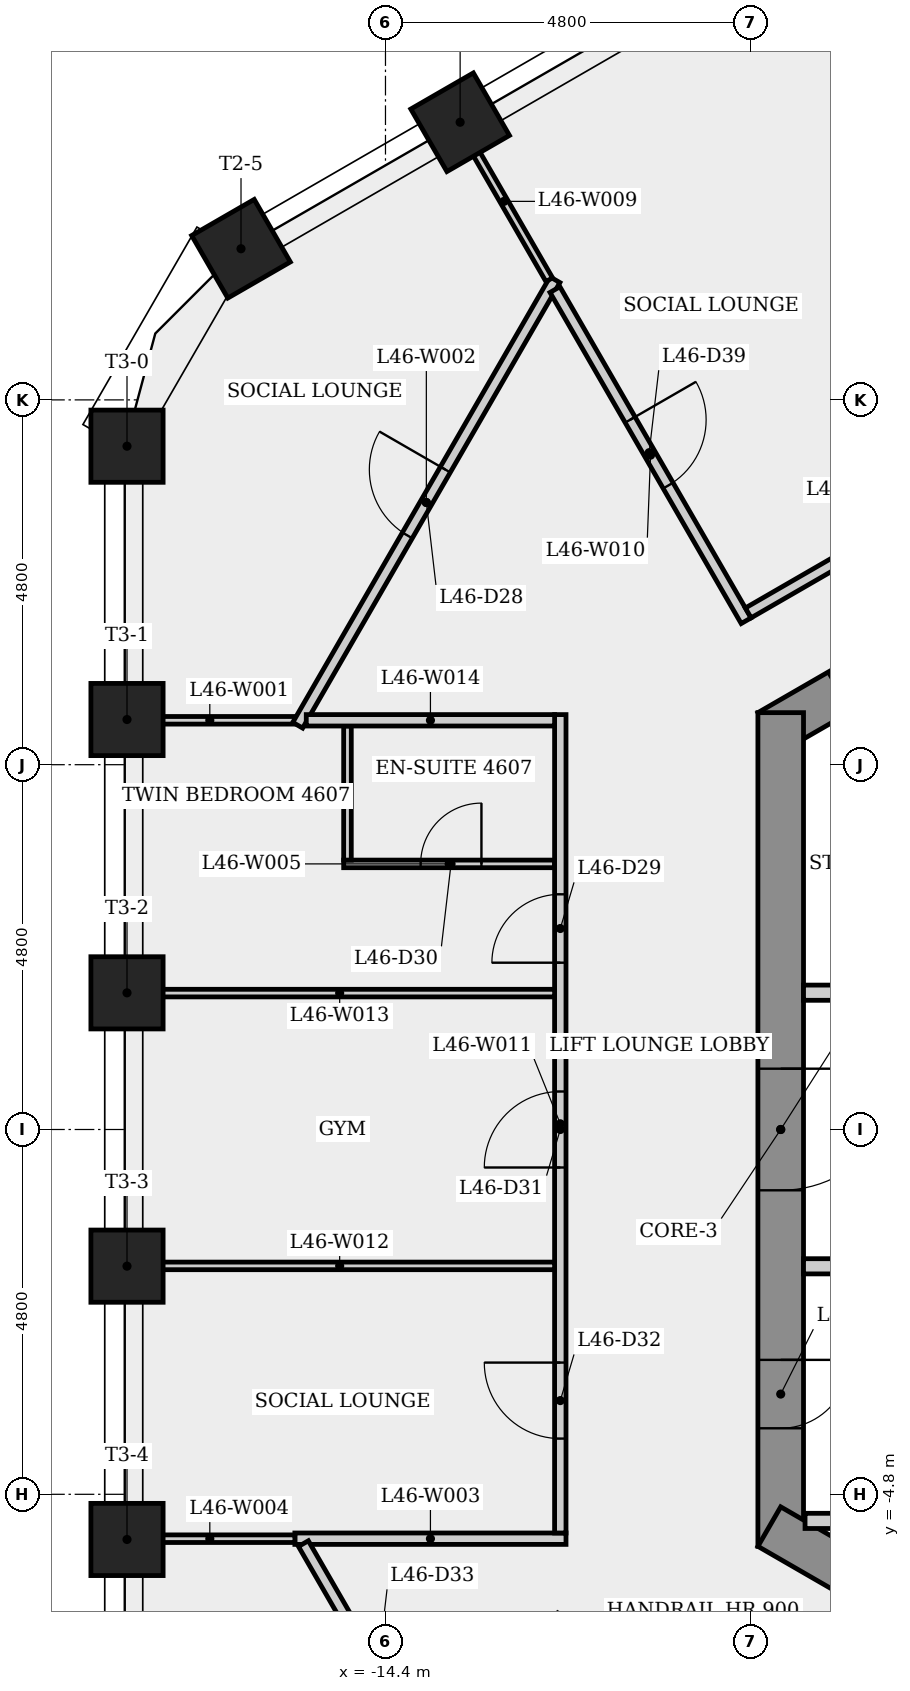
"""IFC4 building model, lengths in metres.
Left out: names, types, materials, properties, quantities, classifications, styles, units other than length and angle.
Written with IfcOpenShell. Run it as: python <this file> out.ifc"""

import sys

from ifc_helpers import new_model, si_unit, direction, frame, frame_2d, origin, origin_2d, place, context, subcontext, project, spatial, rectangle, extrude, element, fill, save


model = new_model("IFC4")
c1 = context("Model", 3, precision=1e-05, world=origin(), true_north=direction((0.0, 1.0)))
c2 = subcontext(c1, "Body", "Model", "MODEL_VIEW")
j1 = project(units=[si_unit("LENGTHUNIT", "METRE"), si_unit("PLANEANGLEUNIT", "RADIAN")], contexts=[c1])
p1 = place(None, origin())
s1 = spatial("IfcSite", under=j1, at=p1, CompositionType="ELEMENT")
p2 = place(p1, origin())
s2 = spatial("IfcBuilding", under=s1, at=p2, CompositionType="ELEMENT")
p3 = place(p2, frame((0.0, 0.0, 173.1)))
s3 = spatial("IfcBuildingStorey", under=s2, at=p3, CompositionType="ELEMENT", Elevation=173.1)
p4 = place(p3, frame((0.15, 10.71, 0.0), z_axis=(0.0, 0.0, 1.0), x_axis=(-0.866023993627, -0.500002442456, 0.0)))
e1 = element("IfcWall", 1, at=p4, inside=s3, PredefinedType="SHEAR", context=c2, shape_type="SweptSolid", body=[
    extrude(rectangle(XDim=10.97, YDim=0.6, at=frame_2d((5.485, 0.0))), origin(), (0.0, 0.0, 1.0), 3.4),
])
p5 = place(p4, frame((9.013, 0.0, 0.0)))
e2 = element("IfcOpeningElement", 2, at=p5, cuts=e1, PredefinedType="OPENING", context=c2, shape_type="SweptSolid", body=[
    extrude(rectangle(XDim=0.9, YDim=2.1, at=frame_2d((0.45, 1.05))), frame((0.0, 0.31, 0.0), z_axis=(0.0, -1.0, 0.0), x_axis=(1.0, 0.0, 0.0)), (0.0, 0.0, 1.0), 0.62),
])
p6 = place(p4, frame((2.437, 0.0, 0.0)))
e3 = element("IfcOpeningElement", 3, at=p6, cuts=e1, PredefinedType="OPENING", context=c2, shape_type="SweptSolid", body=[
    extrude(rectangle(XDim=0.9, YDim=2.1, at=frame_2d((0.45, 1.05))), frame((0.0, 0.31, 0.0), z_axis=(0.0, -1.0, 0.0), x_axis=(1.0, 0.0, 0.0)), (0.0, 0.0, 1.0), 0.62),
])
p7 = place(p3, frame((-9.2, 5.485, 0.0), z_axis=(0.0, 0.0, 1.0), x_axis=(0.0, -1.0, 0.0)))
e4 = element("IfcWall", 4, at=p7, inside=s3, PredefinedType="SHEAR", context=c2, shape_type="SweptSolid", body=[
    extrude(rectangle(XDim=10.97, YDim=0.6, at=frame_2d((5.485, 0.0))), origin(), (0.0, 0.0, 1.0), 3.4),
])
p8 = place(p7, frame((8.516, 0.0, 0.0)))
e5 = element("IfcOpeningElement", 5, at=p8, cuts=e4, PredefinedType="OPENING", context=c2, shape_type="SweptSolid", body=[
    extrude(rectangle(XDim=0.9, YDim=2.1, at=frame_2d((0.45, 1.05))), frame((0.0, 0.31, 0.0), z_axis=(0.0, -1.0, 0.0), x_axis=(1.0, 0.0, 0.0)), (0.0, 0.0, 1.0), 0.62),
])
p9 = place(p7, frame((4.685, 0.0, 0.0)))
e6 = element("IfcOpeningElement", 6, at=p9, cuts=e4, PredefinedType="OPENING", context=c2, shape_type="SweptSolid", body=[
    extrude(rectangle(XDim=1.6, YDim=2.1, at=frame_2d((0.8, 1.05))), frame((0.0, 0.31, 0.0), z_axis=(0.0, -1.0, 0.0), x_axis=(1.0, 0.0, 0.0)), (0.0, 0.0, 1.0), 0.62),
])
p10 = place(p3, frame((-9.35, -5.225, 0.0), z_axis=(0.0, 0.0, 1.0), x_axis=(0.866023993627, -0.500002442456, 0.0)))
e7 = element("IfcWall", 7, at=p10, inside=s3, PredefinedType="SHEAR", context=c2, shape_type="SweptSolid", body=[
    extrude(rectangle(XDim=10.97, YDim=0.6, at=frame_2d((5.485, 0.0))), origin(), (0.0, 0.0, 1.0), 3.4),
])
p11 = place(p10, frame((3.084, 0.0, 0.0)))
e8 = element("IfcOpeningElement", 8, at=p11, cuts=e7, PredefinedType="OPENING", context=c2, shape_type="SweptSolid", body=[
    extrude(rectangle(XDim=0.9, YDim=2.1, at=frame_2d((0.45, 1.05))), frame((0.0, 0.31, 0.0), z_axis=(0.0, -1.0, 0.0), x_axis=(1.0, 0.0, 0.0)), (0.0, 0.0, 1.0), 0.62),
])
p12 = place(p10, frame((8.21, 0.0, 0.0)))
e9 = element("IfcOpeningElement", 9, at=p12, cuts=e7, PredefinedType="OPENING", context=c2, shape_type="SweptSolid", body=[
    extrude(rectangle(XDim=0.9, YDim=2.1, at=frame_2d((0.45, 1.05))), frame((0.0, 0.31, 0.0), z_axis=(0.0, -1.0, 0.0), x_axis=(1.0, 0.0, 0.0)), (0.0, 0.0, 1.0), 0.62),
])
for number, where, z_axis, x_axis in (
    (10, (-13.418, 13.253, 0.0), (0.0, 0.0, 1.0), (-0.5, 0.866, 0.0)),
    (11, (-16.301, 11.589, 0.0), (0.0, 0.0, 1.0), (-0.5, 0.866, 0.0)),
    (12, (-17.801, 8.991, 0.0), (0.0, 0.0, 1.0), (-1.0, 0.0, 0.0)),
    (13, (-17.801, 5.394, 0.0), (0.0, 0.0, 1.0), (-1.0, 0.0, 0.0)),
    (14, (-17.801, 1.798, 0.0), (0.0, 0.0, 1.0), (-1.0, 0.0, 0.0)),
    (15, (-17.801, -1.798, 0.0), (0.0, 0.0, 1.0), (-1.0, 0.0, 0.0)),
    (16, (-17.801, -5.394, 0.0), (0.0, 0.0, 1.0), (-1.0, 0.0, 0.0)),
):
    element("IfcColumn", number, at=place(p3, frame(where, z_axis=z_axis, x_axis=x_axis)), inside=s3, PredefinedType="COLUMN", context=c2, shape_type="SweptSolid", body=[
        extrude(rectangle(XDim=0.95, YDim=0.95, at=origin_2d()), origin(), (0.0, 0.0, 1.0), 3.4),
    ])
p13 = place(p3, frame((-15.592, 5.384, 0.0), z_axis=(0.0, 0.0, 1.0), x_axis=(-1.0, 0.0, 0.0)))
e17 = element("IfcWall", 17, at=p13, inside=s3, PredefinedType="PARTITIONING", context=c2, shape_type="SweptSolid", body=[
    extrude(rectangle(XDim=2.238, YDim=0.1, at=frame_2d((1.119, 0.0))), origin(), (0.0, 0.0, 1.0), 3.05),
])
p14 = place(p3, frame((-15.555, 5.319, 0.0), z_axis=(0.0, 0.0, 1.0), x_axis=(0.500006564844, 0.866021613537, 0.0)))
e18 = element("IfcWall", 18, at=p14, inside=s3, PredefinedType="PARTITIONING", context=c2, shape_type="SweptSolid", body=[
    extrude(rectangle(XDim=6.769, YDim=0.15, at=frame_2d((3.385, 0.0))), origin(), (0.0, 0.0, 1.0), 3.05),
])
p15 = place(p14, frame((2.885, 0.0, 0.0)))
e19 = element("IfcOpeningElement", 19, at=p15, cuts=e18, PredefinedType="OPENING", context=c2, shape_type="SweptSolid", body=[
    extrude(rectangle(XDim=1.0, YDim=2.1, at=frame_2d((0.5, 1.05))), frame((0.0, 0.085, 0.0), z_axis=(0.0, -1.0, 0.0), x_axis=(1.0, 0.0, 0.0)), (0.0, 0.0, 1.0), 0.17),
])
p16 = place(p3, frame((-15.592, -5.384, 0.0), z_axis=(0.0, 0.0, 1.0), x_axis=(1.0, 0.0, 0.0)))
e20 = element("IfcWall", 20, at=p16, inside=s3, PredefinedType="PARTITIONING", context=c2, shape_type="SweptSolid", body=[
    extrude(rectangle(XDim=3.567, YDim=0.15, at=frame_2d((1.784, 0.0))), origin(), (0.0, 0.0, 1.0), 3.05),
])
p17 = place(p3, frame((-15.592, -5.384, 0.0), z_axis=(0.0, 0.0, 1.0), x_axis=(-1.0, 0.0, 0.0)))
e21 = element("IfcWall", 21, at=p17, inside=s3, PredefinedType="PARTITIONING", context=c2, shape_type="SweptSolid", body=[
    extrude(rectangle(XDim=2.239, YDim=0.1, at=frame_2d((1.119, 0.0))), origin(), (0.0, 0.0, 1.0), 3.05),
])
p18 = place(p3, frame((-14.95, 3.495, 0.0), z_axis=(0.0, 0.0, 1.0), x_axis=(1.0, 0.0, 0.0)))
e22 = element("IfcWall", 22, at=p18, inside=s3, PredefinedType="PARTITIONING", context=c2, shape_type="SweptSolid", body=[
    extrude(rectangle(XDim=2.775, YDim=0.1, at=frame_2d((1.387, 0.0))), origin(), (0.0, 0.0, 1.0), 3.05),
])
p19 = place(p18, frame((1.012, 0.0, 0.0)))
e23 = element("IfcOpeningElement", 23, at=p19, cuts=e22, PredefinedType="OPENING", context=c2, shape_type="SweptSolid", body=[
    extrude(rectangle(XDim=0.8, YDim=2.1, at=frame_2d((0.4, 1.05))), frame((0.0, 0.06, 0.0), z_axis=(0.0, -1.0, 0.0), x_axis=(1.0, 0.0, 0.0)), (0.0, 0.0, 1.0), 0.12),
])
p20 = place(p3, frame((-14.9, 5.309, 0.0), z_axis=(0.0, 0.0, 1.0), x_axis=(0.0, -1.0, 0.0)))
e24 = element("IfcWall", 24, at=p20, inside=s3, PredefinedType="PARTITIONING", context=c2, shape_type="SweptSolid", body=[
    extrude(rectangle(XDim=1.764, YDim=0.1, at=frame_2d((0.882, 0.0))), origin(), (0.0, 0.0, 1.0), 3.05),
])
p21 = place(p3, frame((-13.532, -8.822, 0.0), z_axis=(0.0, 0.0, 1.0), x_axis=(-0.500042595688, 0.866000809756, 0.0)))
e25 = element("IfcWall", 25, at=p21, inside=s3, PredefinedType="PARTITIONING", context=c2, shape_type="SweptSolid", body=[
    extrude(rectangle(XDim=3.895, YDim=0.15, at=frame_2d((1.947, 0.0))), origin(), (0.0, 0.0, 1.0), 3.05),
])
p22 = place(p21, frame((1.448, 0.0, 0.0)))
e26 = element("IfcOpeningElement", 26, at=p22, cuts=e25, PredefinedType="OPENING", context=c2, shape_type="SweptSolid", body=[
    extrude(rectangle(XDim=1.0, YDim=2.1, at=frame_2d((0.5, 1.05))), frame((0.0, 0.085, 0.0), z_axis=(0.0, -1.0, 0.0), x_axis=(1.0, 0.0, 0.0)), (0.0, 0.0, 1.0), 0.17),
])
p23 = place(p3, frame((-13.436, 13.243, 0.0), z_axis=(0.0, 0.0, 1.0), x_axis=(0.500021302286, -0.866013104554, 0.0)))
e27 = element("IfcWall", 27, at=p23, inside=s3, PredefinedType="PARTITIONING", context=c2, shape_type="SweptSolid", body=[
    extrude(rectangle(XDim=2.381, YDim=0.1, at=frame_2d((1.19, 0.0))), origin(), (0.0, 0.0, 1.0), 3.05),
])
p24 = place(p3, frame((-12.17, 11.051, 0.0), z_axis=(0.0, 0.0, 1.0), x_axis=(0.500006713398, -0.866021527768, 0.0)))
e28 = element("IfcWall", 28, at=p24, inside=s3, PredefinedType="PARTITIONING", context=c2, shape_type="SweptSolid", body=[
    extrude(rectangle(XDim=5.031, YDim=0.15, at=frame_2d((2.515, 0.0))), origin(), (0.0, 0.0, 1.0), 3.05),
])
p25 = place(p24, frame((1.978, 0.0, 0.0)))
e29 = element("IfcOpeningElement", 29, at=p25, cuts=e28, PredefinedType="OPENING", context=c2, shape_type="SweptSolid", body=[
    extrude(rectangle(XDim=1.0, YDim=2.1, at=frame_2d((0.5, 1.05))), frame((0.0, 0.085, 0.0), z_axis=(0.0, -1.0, 0.0), x_axis=(1.0, 0.0, 0.0)), (0.0, 0.0, 1.0), 0.17),
])
p26 = place(p3, frame((-12.1, -5.309, 0.0), z_axis=(0.0, 0.0, 1.0), x_axis=(0.0, 1.0, 0.0)))
e30 = element("IfcWall", 30, at=p26, inside=s3, PredefinedType="PARTITIONING", context=c2, shape_type="SweptSolid", body=[
    extrude(rectangle(XDim=10.768, YDim=0.15, at=frame_2d((5.384, 0.0))), origin(), (0.0, 0.0, 1.0), 3.05),
])
p27 = place(p26, frame((7.504, 0.0, 0.0)))
e31 = element("IfcOpeningElement", 31, at=p27, cuts=e30, PredefinedType="OPENING", context=c2, shape_type="SweptSolid", body=[
    extrude(rectangle(XDim=0.9, YDim=2.1, at=frame_2d((0.45, 1.05))), frame((0.0, 0.085, 0.0), z_axis=(0.0, -1.0, 0.0), x_axis=(1.0, 0.0, 0.0)), (0.0, 0.0, 1.0), 0.17),
])
p28 = place(p26, frame((4.809, 0.0, 0.0)))
e32 = element("IfcOpeningElement", 32, at=p28, cuts=e30, PredefinedType="OPENING", context=c2, shape_type="SweptSolid", body=[
    extrude(rectangle(XDim=1.0, YDim=2.1, at=frame_2d((0.5, 1.05))), frame((0.0, 0.085, 0.0), z_axis=(0.0, -1.0, 0.0), x_axis=(1.0, 0.0, 0.0)), (0.0, 0.0, 1.0), 0.17),
])
p29 = place(p26, frame((1.242, 0.0, 0.0)))
e33 = element("IfcOpeningElement", 33, at=p29, cuts=e30, PredefinedType="OPENING", context=c2, shape_type="SweptSolid", body=[
    extrude(rectangle(XDim=1.0, YDim=2.1, at=frame_2d((0.5, 1.05))), frame((0.0, 0.085, 0.0), z_axis=(0.0, -1.0, 0.0), x_axis=(1.0, 0.0, 0.0)), (0.0, 0.0, 1.0), 0.17),
])
for number, where, z_axis, x_axis in (
    (34, (-12.175, -1.795, 0.0), (0.0, 0.0, 1.0), (-1.0, 0.0, 0.0)),
    (35, (-12.175, 1.795, 0.0), (0.0, 0.0, 1.0), (-1.0, 0.0, 0.0)),
):
    element("IfcWall", number, at=place(p3, frame(where, z_axis=z_axis, x_axis=x_axis)), inside=s3, PredefinedType="PARTITIONING", context=c2, shape_type="SweptSolid", body=[
        extrude(rectangle(XDim=5.656, YDim=0.1, at=frame_2d((2.828, 0.0))), origin(), (0.0, 0.0, 1.0), 3.05),
    ])
p30 = place(p3, frame((-12.175, 5.384, 0.0), z_axis=(0.0, 0.0, 1.0), x_axis=(-1.0, 0.0, 0.0)))
e36 = element("IfcWall", 36, at=p30, inside=s3, PredefinedType="PARTITIONING", context=c2, shape_type="SweptSolid", body=[
    extrude(rectangle(XDim=3.267, YDim=0.15, at=frame_2d((1.634, 0.0))), origin(), (0.0, 0.0, 1.0), 3.05),
])
p31 = place(p3, frame((-9.627, 6.797, 0.0), z_axis=(0.0, 0.0, 1.0), x_axis=(0.866013897511, 0.50001992892, 0.0)))
e37 = element("IfcWall", 37, at=p31, inside=s3, PredefinedType="PARTITIONING", context=c2, shape_type="SweptSolid", body=[
    extrude(rectangle(XDim=3.268, YDim=0.15, at=frame_2d((1.634, 0.0))), origin(), (0.0, 0.0, 1.0), 3.05),
])
p32 = place(p3, frame((-8.9, 1.8, 0.0), z_axis=(0.0, 0.0, 1.0), x_axis=(1.0, 0.0, 0.0)))
e38 = element("IfcWall", 38, at=p32, inside=s3, PredefinedType="PARTITIONING", context=c2, shape_type="SweptSolid", body=[
    extrude(rectangle(XDim=1.425, YDim=0.2, at=frame_2d((0.712, 0.0))), origin(), (0.0, 0.0, 1.0), 3.05),
])
p33 = place(p3, frame((-8.88, -5.15, 0.0), z_axis=(0.0, 0.0, 1.0), x_axis=(1.0, 0.0, 0.0)))
e39 = element("IfcWall", 39, at=p33, inside=s3, PredefinedType="PARTITIONING", context=c2, shape_type="SweptSolid", body=[
    extrude(rectangle(XDim=11.205, YDim=0.2, at=frame_2d((5.603, 0.0))), origin(), (0.0, 0.0, 1.0), 3.05),
])
p34 = place(p3, frame((-8.9, -1.8, 0.0), z_axis=(0.0, 0.0, 1.0), x_axis=(1.0, 0.0, 0.0)))
e40 = element("IfcWall", 40, at=p34, inside=s3, PredefinedType="PARTITIONING", context=c2, shape_type="SweptSolid", body=[
    extrude(rectangle(XDim=11.225, YDim=0.2, at=frame_2d((5.613, 0.0))), origin(), (0.0, 0.0, 1.0), 3.05),
])
p35 = place(p34, frame((2.16, 0.0, 0.0)))
e41 = element("IfcOpeningElement", 41, at=p35, cuts=e40, PredefinedType="OPENING", context=c2, shape_type="SweptSolid", body=[
    extrude(rectangle(XDim=0.9, YDim=2.1, at=frame_2d((0.45, 1.05))), frame((0.0, 0.11, 0.0), z_axis=(0.0, -1.0, 0.0), x_axis=(1.0, 0.0, 0.0)), (0.0, 0.0, 1.0), 0.22),
])
p36 = place(p34, frame((6.61, 0.0, 0.0)))
e42 = element("IfcOpeningElement", 42, at=p36, cuts=e40, PredefinedType="OPENING", context=c2, shape_type="SweptSolid", body=[
    extrude(rectangle(XDim=0.9, YDim=2.1, at=frame_2d((0.45, 1.05))), frame((0.0, 0.11, 0.0), z_axis=(0.0, -1.0, 0.0), x_axis=(1.0, 0.0, 0.0)), (0.0, 0.0, 1.0), 0.22),
])
p37 = place(p34, frame((9.613, 0.0, 0.0)))
e43 = element("IfcOpeningElement", 43, at=p37, cuts=e40, PredefinedType="OPENING", context=c2, shape_type="SweptSolid", body=[
    extrude(rectangle(XDim=0.9, YDim=2.1, at=frame_2d((0.45, 1.05))), frame((0.0, 0.11, 0.0), z_axis=(0.0, -1.0, 0.0), x_axis=(1.0, 0.0, 0.0)), (0.0, 0.0, 1.0), 0.22),
])
p38 = place(p15, origin())
e44 = element("IfcDoor", 44, at=p38, inside=s3, OperationType="SINGLE_SWING_RIGHT", PredefinedType="DOOR", context=c2, shape_type="SweptSolid", body=[
    extrude(rectangle(XDim=1.0, YDim=2.1, at=frame_2d((0.5, 1.05))), frame((0.0, 0.025, 0.0), z_axis=(0.0, -1.0, 0.0), x_axis=(1.0, 0.0, 0.0)), (0.0, 0.0, 1.0), 0.05),
])
fill(e19, e44)
p39 = place(p27, origin())
e45 = element("IfcDoor", 45, at=p39, inside=s3, OperationType="SINGLE_SWING_LEFT", PredefinedType="DOOR", context=c2, shape_type="SweptSolid", body=[
    extrude(rectangle(XDim=0.9, YDim=2.1, at=frame_2d((0.45, 1.05))), frame((0.0, 0.025, 0.0), z_axis=(0.0, -1.0, 0.0), x_axis=(1.0, 0.0, 0.0)), (0.0, 0.0, 1.0), 0.05),
])
fill(e31, e45)
p40 = place(p19, origin())
e46 = element("IfcDoor", 46, at=p40, inside=s3, OperationType="SINGLE_SWING_RIGHT", PredefinedType="DOOR", context=c2, shape_type="SweptSolid", body=[
    extrude(rectangle(XDim=0.8, YDim=2.1, at=frame_2d((0.4, 1.05))), frame((0.0, 0.025, 0.0), z_axis=(0.0, -1.0, 0.0), x_axis=(1.0, 0.0, 0.0)), (0.0, 0.0, 1.0), 0.05),
])
fill(e23, e46)
p41 = place(p28, origin())
e47 = element("IfcDoor", 47, at=p41, inside=s3, OperationType="SINGLE_SWING_LEFT", PredefinedType="DOOR", context=c2, shape_type="SweptSolid", body=[
    extrude(rectangle(XDim=1.0, YDim=2.1, at=frame_2d((0.5, 1.05))), frame((0.0, 0.025, 0.0), z_axis=(0.0, -1.0, 0.0), x_axis=(1.0, 0.0, 0.0)), (0.0, 0.0, 1.0), 0.05),
])
fill(e32, e47)
p42 = place(p29, origin())
e48 = element("IfcDoor", 48, at=p42, inside=s3, OperationType="SINGLE_SWING_RIGHT", PredefinedType="DOOR", context=c2, shape_type="SweptSolid", body=[
    extrude(rectangle(XDim=1.0, YDim=2.1, at=frame_2d((0.5, 1.05))), frame((0.0, 0.025, 0.0), z_axis=(0.0, -1.0, 0.0), x_axis=(1.0, 0.0, 0.0)), (0.0, 0.0, 1.0), 0.05),
])
fill(e33, e48)
p43 = place(p25, origin())
e49 = element("IfcDoor", 49, at=p43, inside=s3, OperationType="SINGLE_SWING_LEFT", PredefinedType="DOOR", context=c2, shape_type="SweptSolid", body=[
    extrude(rectangle(XDim=1.0, YDim=2.1, at=frame_2d((0.5, 1.05))), frame((0.0, 0.025, 0.0), z_axis=(0.0, -1.0, 0.0), x_axis=(1.0, 0.0, 0.0)), (0.0, 0.0, 1.0), 0.05),
])
fill(e29, e49)
p44 = place(p8, origin())
e50 = element("IfcDoor", 50, at=p44, inside=s3, OperationType="SINGLE_SWING_LEFT", PredefinedType="DOOR", context=c2, shape_type="SweptSolid", body=[
    extrude(rectangle(XDim=0.9, YDim=2.1, at=frame_2d((0.45, 1.05))), frame((0.0, 0.025, 0.0), z_axis=(0.0, -1.0, 0.0), x_axis=(1.0, 0.0, 0.0)), (0.0, 0.0, 1.0), 0.05),
])
fill(e5, e50)
p45 = place(p9, origin())
e51 = element("IfcDoor", 51, at=p45, inside=s3, OperationType="SINGLE_SWING_LEFT", PredefinedType="DOOR", context=c2, shape_type="SweptSolid", body=[
    extrude(rectangle(XDim=1.6, YDim=2.1, at=frame_2d((0.8, 1.05))), frame((0.0, 0.025, 0.0), z_axis=(0.0, -1.0, 0.0), x_axis=(1.0, 0.0, 0.0)), (0.0, 0.0, 1.0), 0.05),
])
fill(e6, e51)
save(model, sys.argv[1])
